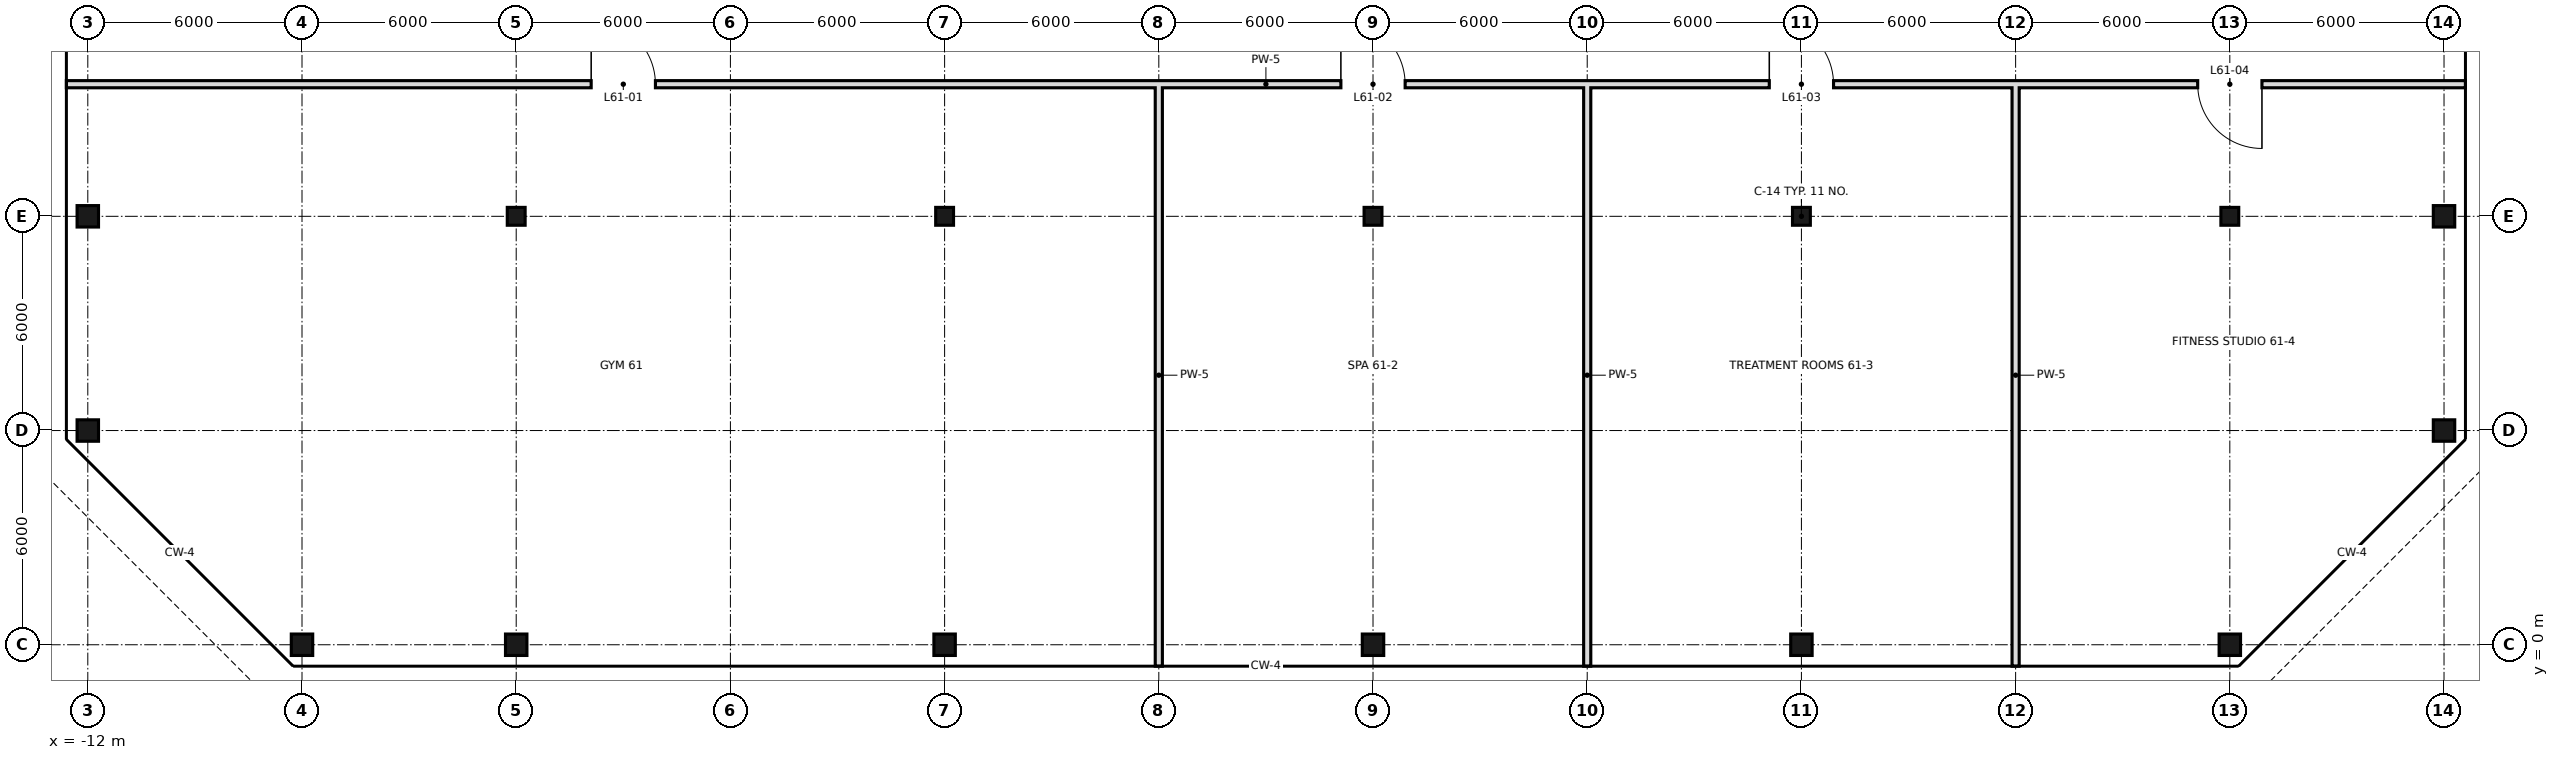
"""IFC4 building model, lengths in metres.
Left out: names, types, materials, properties, quantities, classifications, styles, units other than length and angle.
Written with IfcOpenShell. Run it as: python <this file> out.ifc"""

import sys

from ifc_helpers import new_model, si_unit, direction, frame, frame_2d, origin, origin_2d, place, context, subcontext, project, spatial, rectangle, hollow_rectangle, extrude, element, fill, save


model = new_model("IFC4")
c1 = context("Model", 3, precision=1e-05, world=origin(), true_north=direction((0.0, 1.0)))
c2 = subcontext(c1, "Body", "Model", "MODEL_VIEW")
j1 = project(units=[si_unit("LENGTHUNIT", "METRE"), si_unit("PLANEANGLEUNIT", "RADIAN")], contexts=[c1])
p1 = place(None, origin())
s1 = spatial("IfcSite", under=j1, at=p1, CompositionType="ELEMENT")
p2 = place(p1, origin())
s2 = spatial("IfcBuilding", under=s1, at=p2, CompositionType="ELEMENT")
p3 = place(p2, frame((0.0, 0.0, 257.6)))
s3 = spatial("IfcBuildingStorey", under=s2, at=p3, CompositionType="ELEMENT", Elevation=257.6)
for number, where, z_axis, x_axis in (
    (1, (-12.0, 6.0, 0.0), (0.0, 0.0, 1.0), (1.0, 0.0, 0.0)),
    (2, (-12.0, 12.0, 0.0), (0.0, 0.0, 1.0), (1.0, 0.0, 0.0)),
    (3, (-6.0, 0.0, 0.0), (0.0, 0.0, 1.0), (1.0, 0.0, 0.0)),
    (4, (0.0, 0.0, 0.0), (0.0, 0.0, 1.0), (1.0, 0.0, 0.0)),
):
    element("IfcColumn", number, at=place(p3, frame(where, z_axis=z_axis, x_axis=x_axis)), inside=s3, PredefinedType="COLUMN", context=c2, shape_type="SweptSolid", body=[
        extrude(hollow_rectangle(XDim=0.6, YDim=0.6, WallThickness=0.028, at=origin_2d()), origin(), (0.0, 0.0, 1.0), 5.4),
    ])
p4 = place(p3, frame((0.0, 12.0, 0.0), z_axis=(0.0, 0.0, 1.0), x_axis=(1.0, 0.0, 0.0)))
e5 = element("IfcColumn", 5, at=p4, inside=s3, PredefinedType="COLUMN", context=c2, shape_type="SweptSolid", body=[
    extrude(hollow_rectangle(XDim=0.5, YDim=0.5, WallThickness=0.025, at=origin_2d()), origin(), (0.0, 0.0, 1.0), 5.4),
])
p5 = place(p3, frame((12.0, 0.0, 0.0), z_axis=(0.0, 0.0, 1.0), x_axis=(1.0, 0.0, 0.0)))
e6 = element("IfcColumn", 6, at=p5, inside=s3, PredefinedType="COLUMN", context=c2, shape_type="SweptSolid", body=[
    extrude(hollow_rectangle(XDim=0.6, YDim=0.6, WallThickness=0.028, at=origin_2d()), origin(), (0.0, 0.0, 1.0), 5.4),
])
p6 = place(p3, frame((12.0, 12.0, 0.0), z_axis=(0.0, 0.0, 1.0), x_axis=(1.0, 0.0, 0.0)))
e7 = element("IfcColumn", 7, at=p6, inside=s3, PredefinedType="COLUMN", context=c2, shape_type="SweptSolid", body=[
    extrude(hollow_rectangle(XDim=0.5, YDim=0.5, WallThickness=0.025, at=origin_2d()), origin(), (0.0, 0.0, 1.0), 5.4),
])
p7 = place(p3, frame((24.0, 0.0, 0.0), z_axis=(0.0, 0.0, 1.0), x_axis=(1.0, 0.0, 0.0)))
e8 = element("IfcColumn", 8, at=p7, inside=s3, PredefinedType="COLUMN", context=c2, shape_type="SweptSolid", body=[
    extrude(hollow_rectangle(XDim=0.6, YDim=0.6, WallThickness=0.028, at=origin_2d()), origin(), (0.0, 0.0, 1.0), 5.4),
])
p8 = place(p3, frame((24.0, 12.0, 0.0), z_axis=(0.0, 0.0, 1.0), x_axis=(1.0, 0.0, 0.0)))
e9 = element("IfcColumn", 9, at=p8, inside=s3, PredefinedType="COLUMN", context=c2, shape_type="SweptSolid", body=[
    extrude(hollow_rectangle(XDim=0.5, YDim=0.5, WallThickness=0.025, at=origin_2d()), origin(), (0.0, 0.0, 1.0), 5.4),
])
p9 = place(p3, frame((36.0, 0.0, 0.0), z_axis=(0.0, 0.0, 1.0), x_axis=(1.0, 0.0, 0.0)))
e10 = element("IfcColumn", 10, at=p9, inside=s3, PredefinedType="COLUMN", context=c2, shape_type="SweptSolid", body=[
    extrude(hollow_rectangle(XDim=0.6, YDim=0.6, WallThickness=0.028, at=origin_2d()), origin(), (0.0, 0.0, 1.0), 5.4),
])
p10 = place(p3, frame((36.0, 12.0, 0.0), z_axis=(0.0, 0.0, 1.0), x_axis=(1.0, 0.0, 0.0)))
e11 = element("IfcColumn", 11, at=p10, inside=s3, PredefinedType="COLUMN", context=c2, shape_type="SweptSolid", body=[
    extrude(hollow_rectangle(XDim=0.5, YDim=0.5, WallThickness=0.025, at=origin_2d()), origin(), (0.0, 0.0, 1.0), 5.4),
])
p11 = place(p3, frame((48.0, 0.0, 0.0), z_axis=(0.0, 0.0, 1.0), x_axis=(1.0, 0.0, 0.0)))
e12 = element("IfcColumn", 12, at=p11, inside=s3, PredefinedType="COLUMN", context=c2, shape_type="SweptSolid", body=[
    extrude(hollow_rectangle(XDim=0.6, YDim=0.6, WallThickness=0.028, at=origin_2d()), origin(), (0.0, 0.0, 1.0), 5.4),
])
p12 = place(p3, frame((48.0, 12.0, 0.0), z_axis=(0.0, 0.0, 1.0), x_axis=(1.0, 0.0, 0.0)))
e13 = element("IfcColumn", 13, at=p12, inside=s3, PredefinedType="COLUMN", context=c2, shape_type="SweptSolid", body=[
    extrude(hollow_rectangle(XDim=0.5, YDim=0.5, WallThickness=0.025, at=origin_2d()), origin(), (0.0, 0.0, 1.0), 5.4),
])
for number, where, z_axis, x_axis in (
    (14, (54.0, 6.0, 0.0), (0.0, 0.0, 1.0), (1.0, 0.0, 0.0)),
    (15, (54.0, 12.0, 0.0), (0.0, 0.0, 1.0), (1.0, 0.0, 0.0)),
):
    element("IfcColumn", number, at=place(p3, frame(where, z_axis=z_axis, x_axis=x_axis)), inside=s3, PredefinedType="COLUMN", context=c2, shape_type="SweptSolid", body=[
        extrude(hollow_rectangle(XDim=0.6, YDim=0.6, WallThickness=0.028, at=origin_2d()), origin(), (0.0, 0.0, 1.0), 5.4),
    ])
for number, where, z_axis, x_axis in (
    (16, (18.0, -0.6, 0.0), (0.0, 0.0, 1.0), (0.0, 1.0, 0.0)),
    (17, (30.0, -0.6, 0.0), (0.0, 0.0, 1.0), (0.0, 1.0, 0.0)),
    (18, (42.0, -0.6, 0.0), (0.0, 0.0, 1.0), (0.0, 1.0, 0.0)),
):
    element("IfcWall", number, at=place(p3, frame(where, z_axis=z_axis, x_axis=x_axis)), inside=s3, PredefinedType="SOLIDWALL", context=c2, shape_type="SweptSolid", body=[
        extrude(rectangle(XDim=16.3, YDim=0.2, at=frame_2d((8.15, 0.0))), origin(), (0.0, 0.0, 1.0), 4.52),
    ])
p13 = place(p3, frame((-12.6, 15.7, 0.0), z_axis=(0.0, 0.0, 1.0), x_axis=(1.0, 0.0, 0.0)))
e19 = element("IfcWall", 19, at=p13, inside=s3, PredefinedType="SOLIDWALL", context=c2, shape_type="SweptSolid", body=[
    extrude(rectangle(XDim=67.2, YDim=0.2, at=frame_2d((33.6, 0.0))), origin(), (0.0, 0.0, 1.0), 4.52),
])
p14 = place(p13, frame((14.7, 0.0, 0.0)))
e20 = element("IfcOpeningElement", 20, at=p14, cuts=e19, PredefinedType="OPENING", context=c2, shape_type="SweptSolid", body=[
    extrude(rectangle(XDim=1.8, YDim=2.4, at=frame_2d((0.9, 1.2))), frame((0.0, 0.11, 0.0), z_axis=(0.0, -1.0, 0.0), x_axis=(1.0, 0.0, 0.0)), (0.0, 0.0, 1.0), 0.22),
])
p15 = place(p13, frame((35.7, 0.0, 0.0)))
e21 = element("IfcOpeningElement", 21, at=p15, cuts=e19, PredefinedType="OPENING", context=c2, shape_type="SweptSolid", body=[
    extrude(rectangle(XDim=1.8, YDim=2.4, at=frame_2d((0.9, 1.2))), frame((0.0, 0.11, 0.0), z_axis=(0.0, -1.0, 0.0), x_axis=(1.0, 0.0, 0.0)), (0.0, 0.0, 1.0), 0.22),
])
p16 = place(p13, frame((47.7, 0.0, 0.0)))
e22 = element("IfcOpeningElement", 22, at=p16, cuts=e19, PredefinedType="OPENING", context=c2, shape_type="SweptSolid", body=[
    extrude(rectangle(XDim=1.8, YDim=2.4, at=frame_2d((0.9, 1.2))), frame((0.0, 0.11, 0.0), z_axis=(0.0, -1.0, 0.0), x_axis=(1.0, 0.0, 0.0)), (0.0, 0.0, 1.0), 0.22),
])
p17 = place(p13, frame((59.7, 0.0, 0.0)))
e23 = element("IfcOpeningElement", 23, at=p17, cuts=e19, PredefinedType="OPENING", context=c2, shape_type="SweptSolid", body=[
    extrude(rectangle(XDim=1.8, YDim=2.4, at=frame_2d((0.9, 1.2))), frame((0.0, 0.11, 0.0), z_axis=(0.0, -1.0, 0.0), x_axis=(1.0, 0.0, 0.0)), (0.0, 0.0, 1.0), 0.22),
])
p18 = place(p14, origin())
e24 = element("IfcDoor", 24, at=p18, inside=s3, OperationType="SINGLE_SWING_LEFT", PredefinedType="DOOR", context=c2, shape_type="SweptSolid", body=[
    extrude(rectangle(XDim=1.8, YDim=2.4, at=frame_2d((0.9, 1.2))), frame((0.0, 0.025, 0.0), z_axis=(0.0, -1.0, 0.0), x_axis=(1.0, 0.0, 0.0)), (0.0, 0.0, 1.0), 0.05),
])
fill(e20, e24)
p19 = place(p15, origin())
e25 = element("IfcDoor", 25, at=p19, inside=s3, OperationType="SINGLE_SWING_LEFT", PredefinedType="DOOR", context=c2, shape_type="SweptSolid", body=[
    extrude(rectangle(XDim=1.8, YDim=2.4, at=frame_2d((0.9, 1.2))), frame((0.0, 0.025, 0.0), z_axis=(0.0, -1.0, 0.0), x_axis=(1.0, 0.0, 0.0)), (0.0, 0.0, 1.0), 0.05),
])
fill(e21, e25)
p20 = place(p16, origin())
e26 = element("IfcDoor", 26, at=p20, inside=s3, OperationType="SINGLE_SWING_LEFT", PredefinedType="DOOR", context=c2, shape_type="SweptSolid", body=[
    extrude(rectangle(XDim=1.8, YDim=2.4, at=frame_2d((0.9, 1.2))), frame((0.0, 0.025, 0.0), z_axis=(0.0, -1.0, 0.0), x_axis=(1.0, 0.0, 0.0)), (0.0, 0.0, 1.0), 0.05),
])
fill(e22, e26)
p21 = place(p17, origin())
e27 = element("IfcDoor", 27, at=p21, inside=s3, OperationType="SINGLE_SWING_RIGHT", PredefinedType="DOOR", context=c2, shape_type="SweptSolid", body=[
    extrude(rectangle(XDim=1.8, YDim=2.4, at=frame_2d((0.9, 1.2))), frame((0.0, 0.025, 0.0), z_axis=(0.0, -1.0, 0.0), x_axis=(1.0, 0.0, 0.0)), (0.0, 0.0, 1.0), 0.05),
])
fill(e23, e27)
save(model, sys.argv[1])
